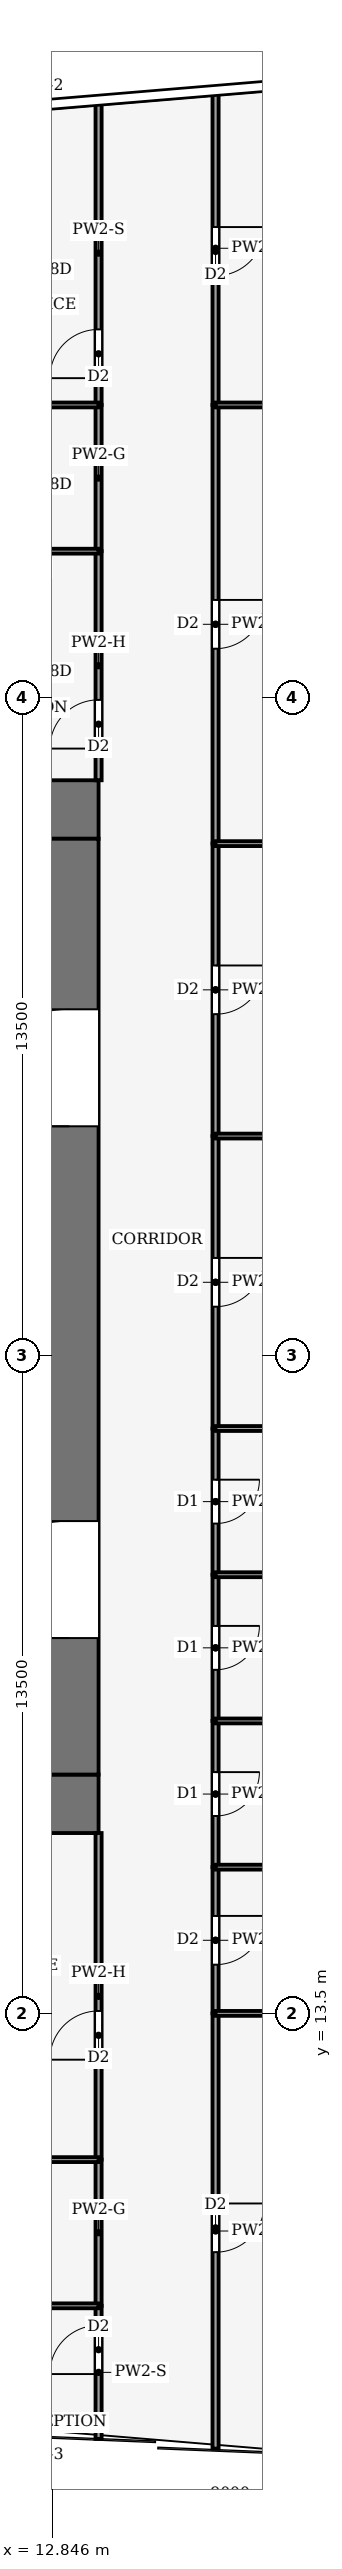
"""IFC4 building model, lengths in metres.
Left out: names, types, materials, properties, quantities, classifications, styles, units other than length and angle.
Written with IfcOpenShell. Run it as: python <this file> out.ifc"""

import sys

from ifc_helpers import new_model, si_unit, direction, frame, frame_2d, origin, place, context, subcontext, project, spatial, rectangle, extrude, element, fill, save


model = new_model("IFC4")
c1 = context("Model", 3, precision=1e-05, world=origin(), true_north=direction((0.0, 1.0)))
c2 = subcontext(c1, "Body", "Model", "MODEL_VIEW")
j1 = project(units=[si_unit("LENGTHUNIT", "METRE"), si_unit("PLANEANGLEUNIT", "RADIAN")], contexts=[c1])
p1 = place(None, origin())
s1 = spatial("IfcSite", under=j1, at=p1, CompositionType="ELEMENT")
p2 = place(p1, origin())
s2 = spatial("IfcBuilding", under=s1, at=p2, CompositionType="ELEMENT")
p3 = place(p2, frame((0.0, 0.0, 82.0)))
s3 = spatial("IfcBuildingStorey", under=s2, at=p3, CompositionType="ELEMENT", Elevation=82.0)
for number, where, z_axis, x_axis in (
    (1, (-13.8, 17.8, -0.13), (0.0, 0.0, 1.0), (1.0, 0.0, 0.0)),
    (2, (-13.8, 38.2, -0.13), (0.0, 0.0, 1.0), (1.0, 0.0, 0.0)),
):
    element("IfcWall", number, at=place(p3, frame(where, z_axis=z_axis, x_axis=x_axis)), inside=s3, PredefinedType="SHEAR", context=c2, shape_type="SweptSolid", body=[
        extrude(rectangle(XDim=27.6, YDim=1.2, at=frame_2d((13.8, 0.0))), origin(), (0.0, 0.0, 1.0), 4.0),
    ])
p4 = place(p3, frame((13.2, 18.4, -0.13), z_axis=(0.0, 0.0, 1.0), x_axis=(0.0, 1.0, 0.0)))
e3 = element("IfcWall", 3, at=p4, inside=s3, PredefinedType="SHEAR", context=c2, shape_type="SweptSolid", body=[
    extrude(rectangle(XDim=19.2, YDim=1.2, at=frame_2d((9.6, 0.0))), origin(), (0.0, 0.0, 1.0), 4.0),
])
p5 = place(p4, frame((2.8, 0.0, 0.13)))
e4 = element("IfcOpeningElement", 4, at=p5, cuts=e3, PredefinedType="OPENING", context=c2, shape_type="SweptSolid", body=[
    extrude(rectangle(XDim=2.4, YDim=2.4, at=frame_2d((1.2, 1.2))), frame((0.0, 0.61, 0.0), z_axis=(0.0, -1.0, 0.0), x_axis=(1.0, 0.0, 0.0)), (0.0, 0.0, 1.0), 1.22),
])
p6 = place(p4, frame((13.3, 0.0, 0.13)))
e5 = element("IfcOpeningElement", 5, at=p6, cuts=e3, PredefinedType="OPENING", context=c2, shape_type="SweptSolid", body=[
    extrude(rectangle(XDim=2.4, YDim=2.4, at=frame_2d((1.2, 1.2))), frame((0.0, 0.61, 0.0), z_axis=(0.0, -1.0, 0.0), x_axis=(1.0, 0.0, 0.0)), (0.0, 0.0, 1.0), 1.22),
])
p7 = place(p3, frame((16.2, 13.5, 0.0), z_axis=(0.0, 0.0, 1.0), x_axis=(0.0, -1.0, 0.0)))
e6 = element("IfcWall", 6, at=p7, inside=s3, PredefinedType="PARTITIONING", context=c2, shape_type="SweptSolid", body=[
    extrude(rectangle(XDim=8.93, YDim=0.125, at=frame_2d((4.465, 0.0))), origin(), (0.0, 0.0, 1.0), 3.04),
])
p8 = place(p7, frame((3.9, 0.0, 0.0)))
e7 = element("IfcOpeningElement", 7, at=p8, cuts=e6, PredefinedType="OPENING", context=c2, shape_type="SweptSolid", body=[
    extrude(rectangle(XDim=1.0, YDim=2.1, at=frame_2d((0.5, 1.05))), frame((0.0, 0.073, 0.0), z_axis=(0.0, -1.0, 0.0), x_axis=(1.0, 0.0, 0.0)), (0.0, 0.0, 1.0), 0.145),
])
p9 = place(p3, frame((16.2, 16.5, 0.0), z_axis=(0.0, 0.0, 1.0), x_axis=(0.0, -1.0, 0.0)))
e8 = element("IfcWall", 8, at=p9, inside=s3, PredefinedType="PARTITIONING", context=c2, shape_type="SweptSolid", body=[
    extrude(rectangle(XDim=3.0, YDim=0.125, at=frame_2d((1.5, 0.0))), origin(), (0.0, 0.0, 1.0), 3.87),
])
p10 = place(p9, frame((1.0, 0.0, 0.0)))
e9 = element("IfcOpeningElement", 9, at=p10, cuts=e8, PredefinedType="OPENING", context=c2, shape_type="SweptSolid", body=[
    extrude(rectangle(XDim=1.0, YDim=2.1, at=frame_2d((0.5, 1.05))), frame((0.0, 0.073, 0.0), z_axis=(0.0, -1.0, 0.0), x_axis=(1.0, 0.0, 0.0)), (0.0, 0.0, 1.0), 0.145),
])
p11 = place(p3, frame((16.2, 19.5, 0.0), z_axis=(0.0, 0.0, 1.0), x_axis=(0.0, -1.0, 0.0)))
e10 = element("IfcWall", 10, at=p11, inside=s3, PredefinedType="PARTITIONING", context=c2, shape_type="SweptSolid", body=[
    extrude(rectangle(XDim=3.0, YDim=0.125, at=frame_2d((1.5, 0.0))), origin(), (0.0, 0.0, 1.0), 3.14),
])
p12 = place(p11, frame((1.05, 0.0, 0.0)))
e11 = element("IfcOpeningElement", 11, at=p12, cuts=e10, PredefinedType="OPENING", context=c2, shape_type="SweptSolid", body=[
    extrude(rectangle(XDim=0.9, YDim=2.1, at=frame_2d((0.45, 1.05))), frame((0.0, 0.073, 0.0), z_axis=(0.0, -1.0, 0.0), x_axis=(1.0, 0.0, 0.0)), (0.0, 0.0, 1.0), 0.145),
])
p13 = place(p3, frame((16.2, 22.5, 0.0), z_axis=(0.0, 0.0, 1.0), x_axis=(0.0, -1.0, 0.0)))
e12 = element("IfcWall", 12, at=p13, inside=s3, PredefinedType="PARTITIONING", context=c2, shape_type="SweptSolid", body=[
    extrude(rectangle(XDim=3.0, YDim=0.125, at=frame_2d((1.5, 0.0))), origin(), (0.0, 0.0, 1.0), 3.87),
])
p14 = place(p13, frame((1.05, 0.0, 0.0)))
e13 = element("IfcOpeningElement", 13, at=p14, cuts=e12, PredefinedType="OPENING", context=c2, shape_type="SweptSolid", body=[
    extrude(rectangle(XDim=0.9, YDim=2.1, at=frame_2d((0.45, 1.05))), frame((0.0, 0.073, 0.0), z_axis=(0.0, -1.0, 0.0), x_axis=(1.0, 0.0, 0.0)), (0.0, 0.0, 1.0), 0.145),
])
p15 = place(p3, frame((16.2, 25.5, 0.0), z_axis=(0.0, 0.0, 1.0), x_axis=(0.0, -1.0, 0.0)))
e14 = element("IfcWall", 14, at=p15, inside=s3, PredefinedType="PARTITIONING", context=c2, shape_type="SweptSolid", body=[
    extrude(rectangle(XDim=3.0, YDim=0.125, at=frame_2d((1.5, 0.0))), origin(), (0.0, 0.0, 1.0), 3.48),
])
p16 = place(p15, frame((1.05, 0.0, 0.0)))
e15 = element("IfcOpeningElement", 15, at=p16, cuts=e14, PredefinedType="OPENING", context=c2, shape_type="SweptSolid", body=[
    extrude(rectangle(XDim=0.9, YDim=2.1, at=frame_2d((0.45, 1.05))), frame((0.0, 0.073, 0.0), z_axis=(0.0, -1.0, 0.0), x_axis=(1.0, 0.0, 0.0)), (0.0, 0.0, 1.0), 0.145),
])
p17 = place(p3, frame((16.2, 31.5, 0.0), z_axis=(0.0, 0.0, 1.0), x_axis=(0.0, -1.0, 0.0)))
e16 = element("IfcWall", 16, at=p17, inside=s3, PredefinedType="PARTITIONING", context=c2, shape_type="SweptSolid", body=[
    extrude(rectangle(XDim=6.0, YDim=0.125, at=frame_2d((3.0, 0.0))), origin(), (0.0, 0.0, 1.0), 3.48),
])
p18 = place(p17, frame((2.5, 0.0, 0.0)))
e17 = element("IfcOpeningElement", 17, at=p18, cuts=e16, PredefinedType="OPENING", context=c2, shape_type="SweptSolid", body=[
    extrude(rectangle(XDim=1.0, YDim=2.1, at=frame_2d((0.5, 1.05))), frame((0.0, 0.073, 0.0), z_axis=(0.0, -1.0, 0.0), x_axis=(1.0, 0.0, 0.0)), (0.0, 0.0, 1.0), 0.145),
])
p19 = place(p3, frame((16.2, 37.5, 0.0), z_axis=(0.0, 0.0, 1.0), x_axis=(0.0, -1.0, 0.0)))
e18 = element("IfcWall", 18, at=p19, inside=s3, PredefinedType="PARTITIONING", context=c2, shape_type="SweptSolid", body=[
    extrude(rectangle(XDim=6.0, YDim=0.125, at=frame_2d((3.0, 0.0))), origin(), (0.0, 0.0, 1.0), 3.48),
])
p20 = place(p19, frame((2.5, 0.0, 0.0)))
e19 = element("IfcOpeningElement", 19, at=p20, cuts=e18, PredefinedType="OPENING", context=c2, shape_type="SweptSolid", body=[
    extrude(rectangle(XDim=1.0, YDim=2.1, at=frame_2d((0.5, 1.05))), frame((0.0, 0.073, 0.0), z_axis=(0.0, -1.0, 0.0), x_axis=(1.0, 0.0, 0.0)), (0.0, 0.0, 1.0), 0.145),
])
p21 = place(p3, frame((16.2, 46.5, 0.0), z_axis=(0.0, 0.0, 1.0), x_axis=(0.0, -1.0, 0.0)))
e20 = element("IfcWall", 20, at=p21, inside=s3, PredefinedType="PARTITIONING", context=c2, shape_type="SweptSolid", body=[
    extrude(rectangle(XDim=9.0, YDim=0.125, at=frame_2d((4.5, 0.0))), origin(), (0.0, 0.0, 1.0), 3.14),
])
p22 = place(p21, frame((4.0, 0.0, 0.0)))
e21 = element("IfcOpeningElement", 21, at=p22, cuts=e20, PredefinedType="OPENING", context=c2, shape_type="SweptSolid", body=[
    extrude(rectangle(XDim=1.0, YDim=2.1, at=frame_2d((0.5, 1.05))), frame((0.0, 0.073, 0.0), z_axis=(0.0, -1.0, 0.0), x_axis=(1.0, 0.0, 0.0)), (0.0, 0.0, 1.0), 0.145),
])
p23 = place(p3, frame((16.2, 52.93, 0.0), z_axis=(0.0, 0.0, 1.0), x_axis=(0.0, -1.0, 0.0)))
e22 = element("IfcWall", 22, at=p23, inside=s3, PredefinedType="PARTITIONING", context=c2, shape_type="SweptSolid", body=[
    extrude(rectangle(XDim=6.43, YDim=0.125, at=frame_2d((3.215, 0.0))), origin(), (0.0, 0.0, 1.0), 3.04),
])
p24 = place(p23, frame((2.78, 0.0, 0.0)))
e23 = element("IfcOpeningElement", 23, at=p24, cuts=e22, PredefinedType="OPENING", context=c2, shape_type="SweptSolid", body=[
    extrude(rectangle(XDim=1.0, YDim=2.1, at=frame_2d((0.5, 1.05))), frame((0.0, 0.073, 0.0), z_axis=(0.0, -1.0, 0.0), x_axis=(1.0, 0.0, 0.0)), (0.0, 0.0, 1.0), 0.145),
])
p25 = place(p3, frame((13.8, 4.77, 0.0), z_axis=(0.0, 0.0, 1.0), x_axis=(0.0, 1.0, 0.0)))
e24 = element("IfcWall", 24, at=p25, inside=s3, PredefinedType="PARTITIONING", context=c2, shape_type="SweptSolid", body=[
    extrude(rectangle(XDim=2.73, YDim=0.125, at=frame_2d((1.365, 0.0))), origin(), (0.0, 0.0, 1.0), 3.04),
])
p26 = place(p25, frame((1.33, 0.0, 0.0)))
e25 = element("IfcOpeningElement", 25, at=p26, cuts=e24, PredefinedType="OPENING", context=c2, shape_type="SweptSolid", body=[
    extrude(rectangle(XDim=1.0, YDim=2.1, at=frame_2d((0.5, 1.05))), frame((0.0, 0.073, 0.0), z_axis=(0.0, -1.0, 0.0), x_axis=(1.0, 0.0, 0.0)), (0.0, 0.0, 1.0), 0.145),
])
p27 = place(p3, frame((13.8, 10.5, 0.0), z_axis=(0.0, 0.0, 1.0), x_axis=(0.0, -1.0, 0.0)))
e26 = element("IfcWall", 26, at=p27, inside=s3, PredefinedType="PARTITIONING", context=c2, shape_type="SweptSolid", body=[
    extrude(rectangle(XDim=3.0, YDim=0.125, at=frame_2d((1.5, 0.0))), origin(), (0.0, 0.0, 1.0), 3.87),
])
p28 = place(p3, frame((13.8, 10.5, 0.0), z_axis=(0.0, 0.0, 1.0), x_axis=(0.0, 1.0, 0.0)))
e27 = element("IfcWall", 27, at=p28, inside=s3, PredefinedType="PARTITIONING", context=c2, shape_type="SweptSolid", body=[
    extrude(rectangle(XDim=6.7, YDim=0.125, at=frame_2d((3.35, 0.0))), origin(), (0.0, 0.0, 1.0), 3.14),
])
p29 = place(p28, frame((2.05, 0.0, 0.0)))
e28 = element("IfcOpeningElement", 28, at=p29, cuts=e27, PredefinedType="OPENING", context=c2, shape_type="SweptSolid", body=[
    extrude(rectangle(XDim=1.0, YDim=2.1, at=frame_2d((0.5, 1.05))), frame((0.0, 0.073, 0.0), z_axis=(0.0, -1.0, 0.0), x_axis=(1.0, 0.0, 0.0)), (0.0, 0.0, 1.0), 0.145),
])
p30 = place(p3, frame((13.8, 38.8, 0.0), z_axis=(0.0, 0.0, 1.0), x_axis=(0.0, 1.0, 0.0)))
e29 = element("IfcWall", 29, at=p30, inside=s3, PredefinedType="PARTITIONING", context=c2, shape_type="SweptSolid", body=[
    extrude(rectangle(XDim=4.7, YDim=0.125, at=frame_2d((2.35, 0.0))), origin(), (0.0, 0.0, 1.0), 3.14),
])
p31 = place(p30, frame((0.65, 0.0, 0.0)))
e30 = element("IfcOpeningElement", 30, at=p31, cuts=e29, PredefinedType="OPENING", context=c2, shape_type="SweptSolid", body=[
    extrude(rectangle(XDim=1.0, YDim=2.1, at=frame_2d((0.5, 1.05))), frame((0.0, 0.073, 0.0), z_axis=(0.0, -1.0, 0.0), x_axis=(1.0, 0.0, 0.0)), (0.0, 0.0, 1.0), 0.145),
])
p32 = place(p3, frame((13.8, 46.5, 0.0), z_axis=(0.0, 0.0, 1.0), x_axis=(0.0, -1.0, 0.0)))
e31 = element("IfcWall", 31, at=p32, inside=s3, PredefinedType="PARTITIONING", context=c2, shape_type="SweptSolid", body=[
    extrude(rectangle(XDim=3.0, YDim=0.125, at=frame_2d((1.5, 0.0))), origin(), (0.0, 0.0, 1.0), 3.87),
])
p33 = place(p3, frame((13.8, 46.5, 0.0), z_axis=(0.0, 0.0, 1.0), x_axis=(0.0, 1.0, 0.0)))
e32 = element("IfcWall", 32, at=p33, inside=s3, PredefinedType="PARTITIONING", context=c2, shape_type="SweptSolid", body=[
    extrude(rectangle(XDim=6.23, YDim=0.125, at=frame_2d((3.115, 0.0))), origin(), (0.0, 0.0, 1.0), 3.04),
])
p34 = place(p33, frame((0.55, 0.0, 0.0)))
e33 = element("IfcOpeningElement", 33, at=p34, cuts=e32, PredefinedType="OPENING", context=c2, shape_type="SweptSolid", body=[
    extrude(rectangle(XDim=1.0, YDim=2.1, at=frame_2d((0.5, 1.05))), frame((0.0, 0.073, 0.0), z_axis=(0.0, -1.0, 0.0), x_axis=(1.0, 0.0, 0.0)), (0.0, 0.0, 1.0), 0.145),
])
p35 = place(p3, frame((23.833, 13.5, 0.0), z_axis=(0.0, 0.0, 1.0), x_axis=(-1.0, 0.0, 0.0)))
e34 = element("IfcWall", 34, at=p35, inside=s3, PredefinedType="PARTITIONING", context=c2, shape_type="SweptSolid", body=[
    extrude(rectangle(XDim=7.634, YDim=0.1, at=frame_2d((3.817, 0.0))), origin(), (0.0, 0.0, 1.0), 3.04),
])
p36 = place(p3, frame((23.587, 16.5, 0.0), z_axis=(0.0, 0.0, 1.0), x_axis=(-1.0, 0.0, 0.0)))
e35 = element("IfcWall", 35, at=p36, inside=s3, PredefinedType="PARTITIONING", context=c2, shape_type="SweptSolid", body=[
    extrude(rectangle(XDim=7.387, YDim=0.1, at=frame_2d((3.693, 0.0))), origin(), (0.0, 0.0, 1.0), 3.04),
])
p37 = place(p3, frame((23.34, 19.5, 0.0), z_axis=(0.0, 0.0, 1.0), x_axis=(-1.0, 0.0, 0.0)))
e36 = element("IfcWall", 36, at=p37, inside=s3, PredefinedType="PARTITIONING", context=c2, shape_type="SweptSolid", body=[
    extrude(rectangle(XDim=7.14, YDim=0.1, at=frame_2d((3.57, 0.0))), origin(), (0.0, 0.0, 1.0), 3.04),
])
p38 = place(p3, frame((23.094, 22.5, 0.0), z_axis=(0.0, 0.0, 1.0), x_axis=(-1.0, 0.0, 0.0)))
e37 = element("IfcWall", 37, at=p38, inside=s3, PredefinedType="PARTITIONING", context=c2, shape_type="SweptSolid", body=[
    extrude(rectangle(XDim=6.894, YDim=0.1, at=frame_2d((3.447, 0.0))), origin(), (0.0, 0.0, 1.0), 3.04),
])
p39 = place(p3, frame((22.847, 25.5, 0.0), z_axis=(0.0, 0.0, 1.0), x_axis=(-1.0, 0.0, 0.0)))
e38 = element("IfcWall", 38, at=p39, inside=s3, PredefinedType="PARTITIONING", context=c2, shape_type="SweptSolid", body=[
    extrude(rectangle(XDim=6.647, YDim=0.1, at=frame_2d((3.324, 0.0))), origin(), (0.0, 0.0, 1.0), 3.04),
])
p40 = place(p3, frame((22.806, 31.5, 0.0), z_axis=(0.0, 0.0, 1.0), x_axis=(-1.0, 0.0, 0.0)))
e39 = element("IfcWall", 39, at=p40, inside=s3, PredefinedType="PARTITIONING", context=c2, shape_type="SweptSolid", body=[
    extrude(rectangle(XDim=6.606, YDim=0.1, at=frame_2d((3.303, 0.0))), origin(), (0.0, 0.0, 1.0), 3.04),
])
p41 = place(p3, frame((23.299, 37.5, 0.0), z_axis=(0.0, 0.0, 1.0), x_axis=(-1.0, 0.0, 0.0)))
e40 = element("IfcWall", 40, at=p41, inside=s3, PredefinedType="PARTITIONING", context=c2, shape_type="SweptSolid", body=[
    extrude(rectangle(XDim=7.099, YDim=0.1, at=frame_2d((3.55, 0.0))), origin(), (0.0, 0.0, 1.0), 3.04),
])
p42 = place(p3, frame((24.039, 46.5, 0.0), z_axis=(0.0, 0.0, 1.0), x_axis=(-1.0, 0.0, 0.0)))
e41 = element("IfcWall", 41, at=p42, inside=s3, PredefinedType="PARTITIONING", context=c2, shape_type="SweptSolid", body=[
    extrude(rectangle(XDim=7.839, YDim=0.1, at=frame_2d((3.919, 0.0))), origin(), (0.0, 0.0, 1.0), 3.04),
])
p43 = place(p3, frame((13.8, 7.5, 0.0), z_axis=(0.0, 0.0, 1.0), x_axis=(-1.0, 0.0, 0.0)))
e42 = element("IfcWall", 42, at=p43, inside=s3, PredefinedType="PARTITIONING", context=c2, shape_type="SweptSolid", body=[
    extrude(rectangle(XDim=6.3, YDim=0.1, at=frame_2d((3.15, 0.0))), origin(), (0.0, 0.0, 1.0), 3.39),
])
p44 = place(p3, frame((13.8, 10.5, 0.0), z_axis=(0.0, 0.0, 1.0), x_axis=(-1.0, 0.0, 0.0)))
e43 = element("IfcWall", 43, at=p44, inside=s3, PredefinedType="PARTITIONING", context=c2, shape_type="SweptSolid", body=[
    extrude(rectangle(XDim=6.3, YDim=0.1, at=frame_2d((3.15, 0.0))), origin(), (0.0, 0.0, 1.0), 3.39),
])
p45 = place(p44, frame((2.65, 0.0, 0.0)))
e44 = element("IfcOpeningElement", 44, at=p45, cuts=e43, PredefinedType="OPENING", context=c2, shape_type="SweptSolid", body=[
    extrude(rectangle(XDim=1.0, YDim=2.1, at=frame_2d((0.5, 1.05))), frame((0.0, 0.06, 0.0), z_axis=(0.0, -1.0, 0.0), x_axis=(1.0, 0.0, 0.0)), (0.0, 0.0, 1.0), 0.12),
])
p46 = place(p3, frame((13.8, 43.5, 0.0), z_axis=(0.0, 0.0, 1.0), x_axis=(-1.0, 0.0, 0.0)))
e45 = element("IfcWall", 45, at=p46, inside=s3, PredefinedType="PARTITIONING", context=c2, shape_type="SweptSolid", body=[
    extrude(rectangle(XDim=3.3, YDim=0.1, at=frame_2d((1.65, 0.0))), origin(), (0.0, 0.0, 1.0), 3.39),
])
p47 = place(p3, frame((13.8, 46.5, 0.0), z_axis=(0.0, 0.0, 1.0), x_axis=(-1.0, 0.0, 0.0)))
e46 = element("IfcWall", 46, at=p47, inside=s3, PredefinedType="PARTITIONING", context=c2, shape_type="SweptSolid", body=[
    extrude(rectangle(XDim=3.3, YDim=0.1, at=frame_2d((1.65, 0.0))), origin(), (0.0, 0.0, 1.0), 3.39),
])
p48 = place(p47, frame((1.95, 0.0, 0.0)))
e47 = element("IfcOpeningElement", 47, at=p48, cuts=e46, PredefinedType="OPENING", context=c2, shape_type="SweptSolid", body=[
    extrude(rectangle(XDim=1.0, YDim=2.1, at=frame_2d((0.5, 1.05))), frame((0.0, 0.06, 0.0), z_axis=(0.0, -1.0, 0.0), x_axis=(1.0, 0.0, 0.0)), (0.0, 0.0, 1.0), 0.12),
])
p49 = place(p5, origin())
e48 = element("IfcDoor", 48, at=p49, inside=s3, OperationType="DOUBLE_DOOR_SINGLE_SWING", PredefinedType="DOOR", context=c2, shape_type="SweptSolid", body=[
    extrude(rectangle(XDim=2.4, YDim=2.4, at=frame_2d((1.2, 1.2))), frame((0.0, 0.025, 0.0), z_axis=(0.0, -1.0, 0.0), x_axis=(1.0, 0.0, 0.0)), (0.0, 0.0, 1.0), 0.05),
])
fill(e4, e48)
p50 = place(p6, origin())
e49 = element("IfcDoor", 49, at=p50, inside=s3, OperationType="DOUBLE_DOOR_SINGLE_SWING", PredefinedType="DOOR", context=c2, shape_type="SweptSolid", body=[
    extrude(rectangle(XDim=2.4, YDim=2.4, at=frame_2d((1.2, 1.2))), frame((0.0, 0.025, 0.0), z_axis=(0.0, -1.0, 0.0), x_axis=(1.0, 0.0, 0.0)), (0.0, 0.0, 1.0), 0.05),
])
fill(e5, e49)
p51 = place(p8, origin())
e50 = element("IfcDoor", 50, at=p51, inside=s3, OperationType="SINGLE_SWING_LEFT", PredefinedType="DOOR", context=c2, shape_type="SweptSolid", body=[
    extrude(rectangle(XDim=1.0, YDim=2.1, at=frame_2d((0.5, 1.05))), frame((0.0, 0.025, 0.0), z_axis=(0.0, -1.0, 0.0), x_axis=(1.0, 0.0, 0.0)), (0.0, 0.0, 1.0), 0.05),
])
fill(e7, e50)
p52 = place(p10, origin())
e51 = element("IfcDoor", 51, at=p52, inside=s3, OperationType="SINGLE_SWING_LEFT", PredefinedType="DOOR", context=c2, shape_type="SweptSolid", body=[
    extrude(rectangle(XDim=1.0, YDim=2.1, at=frame_2d((0.5, 1.05))), frame((0.0, 0.025, 0.0), z_axis=(0.0, -1.0, 0.0), x_axis=(1.0, 0.0, 0.0)), (0.0, 0.0, 1.0), 0.05),
])
fill(e9, e51)
p53 = place(p12, origin())
e52 = element("IfcDoor", 52, at=p53, inside=s3, OperationType="SINGLE_SWING_RIGHT", PredefinedType="DOOR", context=c2, shape_type="SweptSolid", body=[
    extrude(rectangle(XDim=0.9, YDim=2.1, at=frame_2d((0.45, 1.05))), frame((0.0, 0.025, 0.0), z_axis=(0.0, -1.0, 0.0), x_axis=(1.0, 0.0, 0.0)), (0.0, 0.0, 1.0), 0.05),
])
fill(e11, e52)
p54 = place(p14, origin())
e53 = element("IfcDoor", 53, at=p54, inside=s3, OperationType="SINGLE_SWING_LEFT", PredefinedType="DOOR", context=c2, shape_type="SweptSolid", body=[
    extrude(rectangle(XDim=0.9, YDim=2.1, at=frame_2d((0.45, 1.05))), frame((0.0, 0.025, 0.0), z_axis=(0.0, -1.0, 0.0), x_axis=(1.0, 0.0, 0.0)), (0.0, 0.0, 1.0), 0.05),
])
fill(e13, e53)
p55 = place(p16, origin())
e54 = element("IfcDoor", 54, at=p55, inside=s3, OperationType="SINGLE_SWING_RIGHT", PredefinedType="DOOR", context=c2, shape_type="SweptSolid", body=[
    extrude(rectangle(XDim=0.9, YDim=2.1, at=frame_2d((0.45, 1.05))), frame((0.0, 0.025, 0.0), z_axis=(0.0, -1.0, 0.0), x_axis=(1.0, 0.0, 0.0)), (0.0, 0.0, 1.0), 0.05),
])
fill(e15, e54)
p56 = place(p18, origin())
e55 = element("IfcDoor", 55, at=p56, inside=s3, OperationType="SINGLE_SWING_LEFT", PredefinedType="DOOR", context=c2, shape_type="SweptSolid", body=[
    extrude(rectangle(XDim=1.0, YDim=2.1, at=frame_2d((0.5, 1.05))), frame((0.0, 0.025, 0.0), z_axis=(0.0, -1.0, 0.0), x_axis=(1.0, 0.0, 0.0)), (0.0, 0.0, 1.0), 0.05),
])
fill(e17, e55)
p57 = place(p20, origin())
e56 = element("IfcDoor", 56, at=p57, inside=s3, OperationType="SINGLE_SWING_RIGHT", PredefinedType="DOOR", context=c2, shape_type="SweptSolid", body=[
    extrude(rectangle(XDim=1.0, YDim=2.1, at=frame_2d((0.5, 1.05))), frame((0.0, 0.025, 0.0), z_axis=(0.0, -1.0, 0.0), x_axis=(1.0, 0.0, 0.0)), (0.0, 0.0, 1.0), 0.05),
])
fill(e19, e56)
p58 = place(p22, origin())
e57 = element("IfcDoor", 57, at=p58, inside=s3, OperationType="SINGLE_SWING_LEFT", PredefinedType="DOOR", context=c2, shape_type="SweptSolid", body=[
    extrude(rectangle(XDim=1.0, YDim=2.1, at=frame_2d((0.5, 1.05))), frame((0.0, 0.025, 0.0), z_axis=(0.0, -1.0, 0.0), x_axis=(1.0, 0.0, 0.0)), (0.0, 0.0, 1.0), 0.05),
])
fill(e21, e57)
p59 = place(p24, origin())
e58 = element("IfcDoor", 58, at=p59, inside=s3, OperationType="SINGLE_SWING_RIGHT", PredefinedType="DOOR", context=c2, shape_type="SweptSolid", body=[
    extrude(rectangle(XDim=1.0, YDim=2.1, at=frame_2d((0.5, 1.05))), frame((0.0, 0.025, 0.0), z_axis=(0.0, -1.0, 0.0), x_axis=(1.0, 0.0, 0.0)), (0.0, 0.0, 1.0), 0.05),
])
fill(e23, e58)
p60 = place(p26, origin())
e59 = element("IfcDoor", 59, at=p60, inside=s3, OperationType="SINGLE_SWING_RIGHT", PredefinedType="DOOR", context=c2, shape_type="SweptSolid", body=[
    extrude(rectangle(XDim=1.0, YDim=2.1, at=frame_2d((0.5, 1.05))), frame((0.0, 0.025, 0.0), z_axis=(0.0, -1.0, 0.0), x_axis=(1.0, 0.0, 0.0)), (0.0, 0.0, 1.0), 0.05),
])
fill(e25, e59)
p61 = place(p29, origin())
e60 = element("IfcDoor", 60, at=p61, inside=s3, OperationType="SINGLE_SWING_LEFT", PredefinedType="DOOR", context=c2, shape_type="SweptSolid", body=[
    extrude(rectangle(XDim=1.0, YDim=2.1, at=frame_2d((0.5, 1.05))), frame((0.0, 0.025, 0.0), z_axis=(0.0, -1.0, 0.0), x_axis=(1.0, 0.0, 0.0)), (0.0, 0.0, 1.0), 0.05),
])
fill(e28, e60)
p62 = place(p31, origin())
e61 = element("IfcDoor", 61, at=p62, inside=s3, OperationType="SINGLE_SWING_LEFT", PredefinedType="DOOR", context=c2, shape_type="SweptSolid", body=[
    extrude(rectangle(XDim=1.0, YDim=2.1, at=frame_2d((0.5, 1.05))), frame((0.0, 0.025, 0.0), z_axis=(0.0, -1.0, 0.0), x_axis=(1.0, 0.0, 0.0)), (0.0, 0.0, 1.0), 0.05),
])
fill(e30, e61)
p63 = place(p34, origin())
e62 = element("IfcDoor", 62, at=p63, inside=s3, OperationType="SINGLE_SWING_LEFT", PredefinedType="DOOR", context=c2, shape_type="SweptSolid", body=[
    extrude(rectangle(XDim=1.0, YDim=2.1, at=frame_2d((0.5, 1.05))), frame((0.0, 0.025, 0.0), z_axis=(0.0, -1.0, 0.0), x_axis=(1.0, 0.0, 0.0)), (0.0, 0.0, 1.0), 0.05),
])
fill(e33, e62)
save(model, sys.argv[1])
